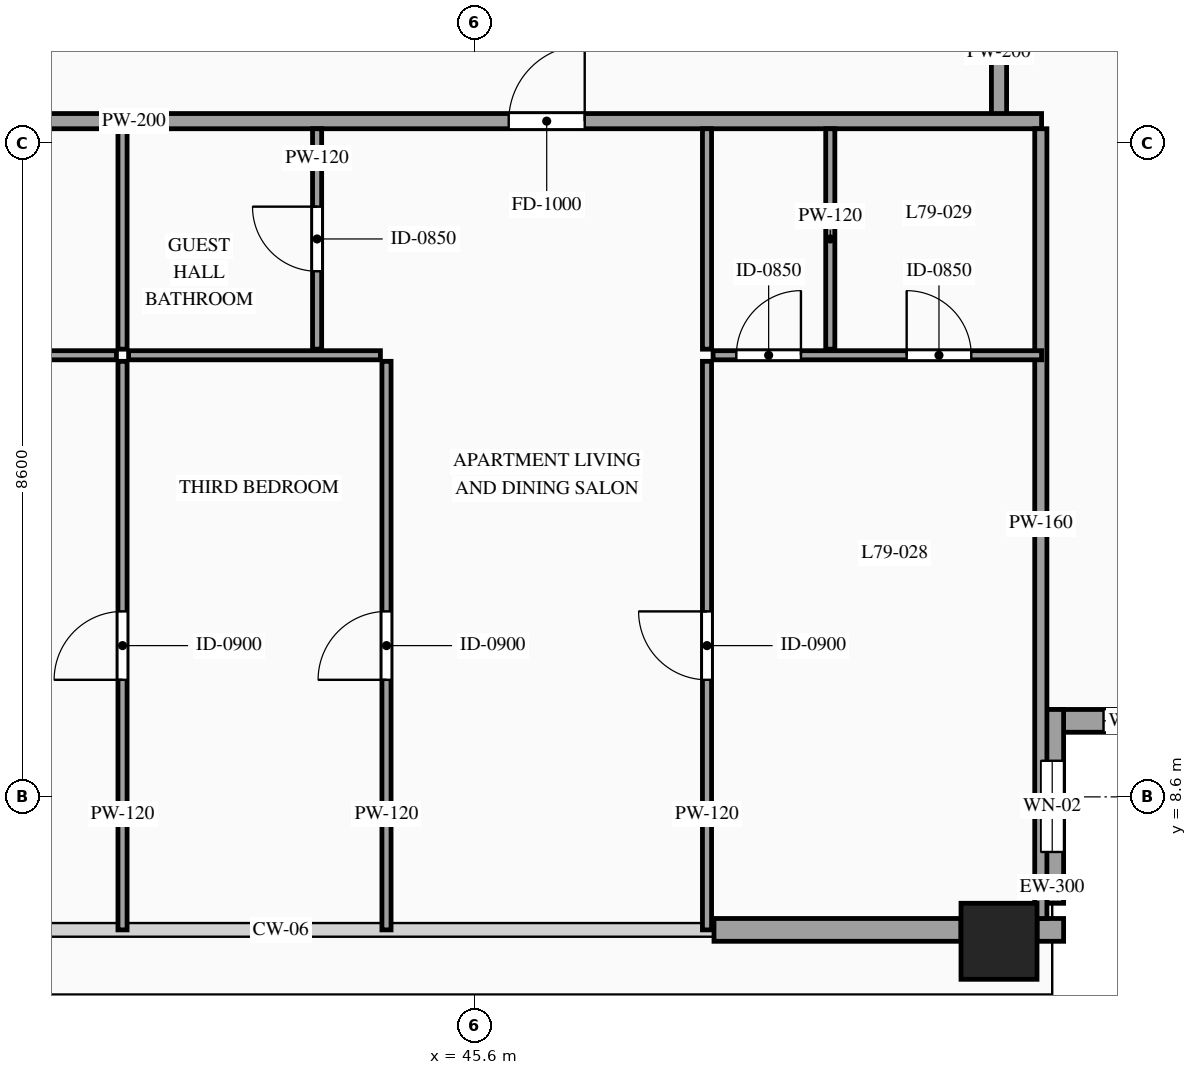
"""IFC4 building model, lengths in metres.
Left out: names, types, materials, properties, quantities, classifications, styles, units other than length and angle.
Written with IfcOpenShell. Run it as: python <this file> out.ifc"""

import sys

from ifc_helpers import new_model, si_unit, direction, frame, frame_2d, origin, origin_2d, place, context, subcontext, project, spatial, rectangle, hollow_rectangle, extrude, source, transform, mapped, element, fill, save


model = new_model("IFC4")
c1 = context("Model", 3, precision=1e-05, world=origin(), true_north=direction((0.0, 1.0)))
c2 = subcontext(c1, "Body", "Model", "MODEL_VIEW")
j1 = project(units=[si_unit("LENGTHUNIT", "METRE"), si_unit("PLANEANGLEUNIT", "RADIAN")], contexts=[c1])
p1 = place(None, origin())
s1 = spatial("IfcSite", under=j1, at=p1, CompositionType="ELEMENT")
p2 = place(p1, origin())
s2 = spatial("IfcBuilding", under=s1, at=p2, CompositionType="ELEMENT")
p3 = place(p2, frame((0.0, 0.0, 296.1)))
s3 = spatial("IfcBuildingStorey", under=s2, at=p3, CompositionType="ELEMENT", Elevation=296.1)
m1 = source(origin(), c2, "Body", "SweptSolid", [
    extrude(hollow_rectangle(XDim=1.0, YDim=1.0, WallThickness=0.048, at=origin_2d()), origin(), (0.0, 0.0, 1.0), 3.5),
])
p4 = place(p3, frame((52.5, 6.7, 0.0), z_axis=(0.0, 0.0, 1.0), x_axis=(1.0, 0.0, 0.0)))
e1 = element("IfcColumn", 1, at=p4, inside=s3, PredefinedType="COLUMN", context=c2, shape_type="MappedRepresentation", body=[
    mapped(m1, transform((0.0, 0.0, 0.0), scale=1.0)),
])
p5 = place(p3, frame((53.05, 9.6, 0.0), z_axis=(0.0, 0.0, 1.0), x_axis=(1.0, 0.0, 0.0)))
e2 = element("IfcWall", 2, at=p5, inside=s3, PredefinedType="SOLIDWALL", context=c2, shape_type="SweptSolid", body=[
    extrude(rectangle(XDim=2.55, YDim=0.3, at=frame_2d((1.275, 0.0))), origin(), (0.0, 0.0, 1.0), 3.28),
])
p6 = place(p5, frame((0.825, 0.0, 0.85)))
e3 = element("IfcOpeningElement", 3, at=p6, cuts=e2, PredefinedType="OPENING", context=c2, shape_type="SweptSolid", body=[
    extrude(rectangle(XDim=0.9, YDim=1.5, at=frame_2d((0.45, 0.75))), frame((0.0, 0.165, 0.0), z_axis=(0.0, -1.0, 0.0), x_axis=(1.0, 0.0, 0.0)), (0.0, 0.0, 1.0), 0.33),
])
p7 = place(p3, frame((53.2, 7.2, 0.0), z_axis=(0.0, 0.0, 1.0), x_axis=(0.0, 1.0, 0.0)))
e4 = element("IfcWall", 4, at=p7, inside=s3, PredefinedType="SOLIDWALL", context=c2, shape_type="SweptSolid", body=[
    extrude(rectangle(XDim=2.55, YDim=0.3, at=frame_2d((1.275, 0.0))), origin(), (0.0, 0.0, 1.0), 3.28),
])
p8 = place(p7, frame((0.675, 0.0, 0.85)))
e5 = element("IfcOpeningElement", 5, at=p8, cuts=e4, PredefinedType="OPENING", context=c2, shape_type="SweptSolid", body=[
    extrude(rectangle(XDim=1.2, YDim=2.1, at=frame_2d((0.6, 1.05))), frame((0.0, 0.165, 0.0), z_axis=(0.0, -1.0, 0.0), x_axis=(1.0, 0.0, 0.0)), (0.0, 0.0, 1.0), 0.33),
])
m2 = source(origin(), c2, "Body", "SweptSolid", [
    extrude(rectangle(XDim=0.35, YDim=0.3, at=frame_2d((0.175, 0.0))), origin(), (0.0, 0.0, 1.0), 3.28),
])
p9 = place(p3, frame((53.0, 6.85, 0.0), z_axis=(0.0, 0.0, 1.0), x_axis=(1.0, 0.0, 0.0)))
e6 = element("IfcWall", 6, at=p9, inside=s3, PredefinedType="SOLIDWALL", context=c2, shape_type="MappedRepresentation", body=[
    mapped(m2, transform((0.0, 0.0, 0.0), scale=1.0)),
])
m3 = source(origin(), c2, "Body", "SweptSolid", [
    extrude(rectangle(XDim=3.25, YDim=0.3, at=frame_2d((1.625, 0.0))), origin(), (0.0, 0.0, 1.0), 2.885),
])
p10 = place(p3, frame((48.75, 6.85, 0.0), z_axis=(0.0, 0.0, 1.0), x_axis=(1.0, 0.0, 0.0)))
e7 = element("IfcWall", 7, at=p10, inside=s3, PredefinedType="SOLIDWALL", context=c2, shape_type="MappedRepresentation", body=[
    mapped(m3, transform((0.0, 0.0, 0.0), scale=1.0)),
])
m4 = source(origin(), c2, "Body", "SweptSolid", [
    extrude(rectangle(XDim=1.7, YDim=0.2, at=frame_2d((0.85, 0.0))), origin(), (0.0, 0.0, 1.0), 3.28),
])
p11 = place(p3, frame((52.5, 17.55, 0.0), z_axis=(0.0, 0.0, 1.0), x_axis=(0.0, 1.0, 0.0)))
e8 = element("IfcWall", 8, at=p11, inside=s3, PredefinedType="PARTITIONING", context=c2, shape_type="MappedRepresentation", body=[
    mapped(m4, transform((0.0, 0.0, 0.0), scale=1.0)),
])
p12 = place(p3, frame((36.438, 17.49, 0.0), z_axis=(0.0, 0.0, 1.0), x_axis=(1.0, 0.0, 0.0)))
e9 = element("IfcWall", 9, at=p12, inside=s3, PredefinedType="PARTITIONING", context=c2, shape_type="SweptSolid", body=[
    extrude(rectangle(XDim=16.622, YDim=0.2, at=frame_2d((8.311, 0.0))), origin(), (0.0, 0.0, 1.0), 3.28),
])
p13 = place(p12, frame((9.611, 0.0, 0.0)))
e10 = element("IfcOpeningElement", 10, at=p13, cuts=e9, PredefinedType="OPENING", context=c2, shape_type="SweptSolid", body=[
    extrude(rectangle(XDim=1.0, YDim=2.2, at=frame_2d((0.5, 1.1))), frame((0.0, 0.115, 0.0), z_axis=(0.0, -1.0, 0.0), x_axis=(1.0, 0.0, 0.0)), (0.0, 0.0, 1.0), 0.23),
])
m5 = source(origin(), c2, "Body", "SweptSolid", [
    extrude(rectangle(XDim=10.39, YDim=0.16, at=frame_2d((5.195, 0.0))), origin(), (0.0, 0.0, 1.0), 3.28),
])
p14 = place(p3, frame((53.05, 7.0, 0.0), z_axis=(0.0, 0.0, 1.0), x_axis=(0.0, 1.0, 0.0)))
e11 = element("IfcWall", 11, at=p14, inside=s3, PredefinedType="PARTITIONING", context=c2, shape_type="MappedRepresentation", body=[
    mapped(m5, transform((0.0, 0.0, 0.0), scale=1.0)),
])
p15 = place(p3, frame((36.438, 14.41, 0.0), z_axis=(0.0, 0.0, 1.0), x_axis=(1.0, 0.0, 0.0)))
e12 = element("IfcWall", 12, at=p15, inside=s3, PredefinedType="PARTITIONING", context=c2, shape_type="SweptSolid", body=[
    extrude(rectangle(XDim=4.45, YDim=0.12, at=frame_2d((2.225, 0.0))), origin(), (0.0, 0.0, 1.0), 3.28),
])
p16 = place(p15, frame((1.8, 0.0, 0.0)))
e13 = element("IfcOpeningElement", 13, at=p16, cuts=e12, PredefinedType="OPENING", context=c2, shape_type="SweptSolid", body=[
    extrude(rectangle(XDim=0.85, YDim=2.1, at=frame_2d((0.425, 1.05))), frame((0.0, 0.075, 0.0), z_axis=(0.0, -1.0, 0.0), x_axis=(1.0, 0.0, 0.0)), (0.0, 0.0, 1.0), 0.15),
])
m6 = source(origin(), c2, "Body", "SweptSolid", [
    extrude(rectangle(XDim=2.9, YDim=0.12, at=frame_2d((1.45, 0.0))), origin(), (0.0, 0.0, 1.0), 3.28),
])
p17 = place(p3, frame((40.968, 14.49, 0.0), z_axis=(0.0, 0.0, 1.0), x_axis=(0.0, 1.0, 0.0)))
e14 = element("IfcWall", 14, at=p17, inside=s3, PredefinedType="PARTITIONING", context=c2, shape_type="MappedRepresentation", body=[
    mapped(m6, transform((0.0, 0.0, 0.0), scale=1.0)),
])
p18 = place(p3, frame((43.528, 14.49, 0.0), z_axis=(0.0, 0.0, 1.0), x_axis=(0.0, 1.0, 0.0)))
e15 = element("IfcWall", 15, at=p18, inside=s3, PredefinedType="PARTITIONING", context=c2, shape_type="SweptSolid", body=[
    extrude(rectangle(XDim=2.9, YDim=0.12, at=frame_2d((1.45, 0.0))), origin(), (0.0, 0.0, 1.0), 3.28),
])
p19 = place(p18, frame((1.025, 0.0, 0.0)))
e16 = element("IfcOpeningElement", 16, at=p19, cuts=e15, PredefinedType="OPENING", context=c2, shape_type="SweptSolid", body=[
    extrude(rectangle(XDim=0.85, YDim=2.1, at=frame_2d((0.425, 1.05))), frame((0.0, 0.075, 0.0), z_axis=(0.0, -1.0, 0.0), x_axis=(1.0, 0.0, 0.0)), (0.0, 0.0, 1.0), 0.15),
])
m7 = source(origin(), c2, "Body", "SweptSolid", [
    extrude(rectangle(XDim=2.9, YDim=0.12, at=frame_2d((1.45, 0.0))), origin(), (0.0, 0.0, 1.0), 2.825),
])
p20 = place(p3, frame((50.28, 14.49, 0.0), z_axis=(0.0, 0.0, 1.0), x_axis=(0.0, 1.0, 0.0)))
e17 = element("IfcWall", 17, at=p20, inside=s3, PredefinedType="PARTITIONING", context=c2, shape_type="MappedRepresentation", body=[
    mapped(m7, transform((0.0, 0.0, 0.0), scale=1.0)),
])
p21 = place(p3, frame((48.658, 14.49, 0.0), z_axis=(0.0, 0.0, 1.0), x_axis=(0.0, 1.0, 0.0)))
e18 = element("IfcWall", 18, at=p21, inside=s3, PredefinedType="PARTITIONING", context=c2, shape_type="MappedRepresentation", body=[
    mapped(m6, transform((0.0, 0.0, 0.0), scale=1.0)),
])
p22 = place(p3, frame((40.968, 6.85, 0.0), z_axis=(0.0, 0.0, 1.0), x_axis=(0.0, 1.0, 0.0)))
e19 = element("IfcWall", 19, at=p22, inside=s3, PredefinedType="PARTITIONING", context=c2, shape_type="SweptSolid", body=[
    extrude(rectangle(XDim=7.48, YDim=0.12, at=frame_2d((3.74, 0.0))), origin(), (0.0, 0.0, 1.0), 3.28),
])
p23 = place(p22, frame((3.29, 0.0, 0.0)))
e20 = element("IfcOpeningElement", 20, at=p23, cuts=e19, PredefinedType="OPENING", context=c2, shape_type="SweptSolid", body=[
    extrude(rectangle(XDim=0.9, YDim=2.15, at=frame_2d((0.45, 1.075))), frame((0.0, 0.075, 0.0), z_axis=(0.0, -1.0, 0.0), x_axis=(1.0, 0.0, 0.0)), (0.0, 0.0, 1.0), 0.15),
])
p24 = place(p3, frame((48.738, 14.41, 0.0), z_axis=(0.0, 0.0, 1.0), x_axis=(1.0, 0.0, 0.0)))
e21 = element("IfcWall", 21, at=p24, inside=s3, PredefinedType="PARTITIONING", context=c2, shape_type="SweptSolid", body=[
    extrude(rectangle(XDim=4.322, YDim=0.12, at=frame_2d((2.161, 0.0))), origin(), (0.0, 0.0, 1.0), 3.28),
])
p25 = place(p24, frame((2.547, 0.0, 0.0)))
e22 = element("IfcOpeningElement", 22, at=p25, cuts=e21, PredefinedType="OPENING", context=c2, shape_type="SweptSolid", body=[
    extrude(rectangle(XDim=0.85, YDim=2.1, at=frame_2d((0.425, 1.05))), frame((0.0, 0.075, 0.0), z_axis=(0.0, -1.0, 0.0), x_axis=(1.0, 0.0, 0.0)), (0.0, 0.0, 1.0), 0.15),
])
p26 = place(p24, frame((0.306, 0.0, 0.0)))
e23 = element("IfcOpeningElement", 23, at=p26, cuts=e21, PredefinedType="OPENING", context=c2, shape_type="SweptSolid", body=[
    extrude(rectangle(XDim=0.85, YDim=2.1, at=frame_2d((0.425, 1.05))), frame((0.0, 0.075, 0.0), z_axis=(0.0, -1.0, 0.0), x_axis=(1.0, 0.0, 0.0)), (0.0, 0.0, 1.0), 0.15),
])
p27 = place(p3, frame((48.658, 6.85, 0.0), z_axis=(0.0, 0.0, 1.0), x_axis=(0.0, 1.0, 0.0)))
e24 = element("IfcWall", 24, at=p27, inside=s3, PredefinedType="PARTITIONING", context=c2, shape_type="SweptSolid", body=[
    extrude(rectangle(XDim=7.48, YDim=0.12, at=frame_2d((3.74, 0.0))), origin(), (0.0, 0.0, 1.0), 3.28),
])
p28 = place(p27, frame((3.29, 0.0, 0.0)))
e25 = element("IfcOpeningElement", 25, at=p28, cuts=e24, PredefinedType="OPENING", context=c2, shape_type="SweptSolid", body=[
    extrude(rectangle(XDim=0.9, YDim=2.15, at=frame_2d((0.45, 1.075))), frame((0.0, 0.075, 0.0), z_axis=(0.0, -1.0, 0.0), x_axis=(1.0, 0.0, 0.0)), (0.0, 0.0, 1.0), 0.15),
])
m8 = source(origin(), c2, "Body", "SweptSolid", [
    extrude(rectangle(XDim=3.313, YDim=0.12, at=frame_2d((1.656, 0.0))), origin(), (0.0, 0.0, 1.0), 3.28),
])
p29 = place(p3, frame((41.048, 14.41, 0.0), z_axis=(0.0, 0.0, 1.0), x_axis=(1.0, 0.0, 0.0)))
e26 = element("IfcWall", 26, at=p29, inside=s3, PredefinedType="PARTITIONING", context=c2, shape_type="MappedRepresentation", body=[
    mapped(m8, transform((0.0, 0.0, 0.0), scale=1.0)),
])
p30 = place(p3, frame((44.441, 6.85, 0.0), z_axis=(0.0, 0.0, 1.0), x_axis=(0.0, 1.0, 0.0)))
e27 = element("IfcWall", 27, at=p30, inside=s3, PredefinedType="PARTITIONING", context=c2, shape_type="SweptSolid", body=[
    extrude(rectangle(XDim=7.48, YDim=0.12, at=frame_2d((3.74, 0.0))), origin(), (0.0, 0.0, 1.0), 3.28),
])
p31 = place(p30, frame((3.29, 0.0, 0.0)))
e28 = element("IfcOpeningElement", 28, at=p31, cuts=e27, PredefinedType="OPENING", context=c2, shape_type="SweptSolid", body=[
    extrude(rectangle(XDim=0.9, YDim=2.15, at=frame_2d((0.45, 1.075))), frame((0.0, 0.075, 0.0), z_axis=(0.0, -1.0, 0.0), x_axis=(1.0, 0.0, 0.0)), (0.0, 0.0, 1.0), 0.15),
])
m9 = source(origin(), c2, "Body", "SweptSolid", [
    extrude(rectangle(XDim=0.9, YDim=1.5, at=frame_2d((0.45, 0.75))), frame((0.0, 0.03, 0.0), z_axis=(0.0, -1.0, 0.0), x_axis=(1.0, 0.0, 0.0)), (0.0, 0.0, 1.0), 0.06),
])
p32 = place(p6, origin())
e29 = element("IfcWindow", 29, at=p32, inside=s3, PartitioningType="SINGLE_PANEL", PredefinedType="WINDOW", context=c2, shape_type="MappedRepresentation", body=[
    mapped(m9, transform((0.0, 0.0, 0.0), scale=1.0)),
])
fill(e3, e29)
m10 = source(origin(), c2, "Body", "SweptSolid", [
    extrude(rectangle(XDim=1.2, YDim=2.1, at=frame_2d((0.6, 1.05))), frame((0.0, 0.03, 0.0), z_axis=(0.0, -1.0, 0.0), x_axis=(1.0, 0.0, 0.0)), (0.0, 0.0, 1.0), 0.06),
])
p33 = place(p8, origin())
e30 = element("IfcWindow", 30, at=p33, inside=s3, PartitioningType="SINGLE_PANEL", PredefinedType="WINDOW", context=c2, shape_type="MappedRepresentation", body=[
    mapped(m10, transform((0.0, 0.0, 0.0), scale=1.0)),
])
fill(e5, e30)
m11 = source(origin(), c2, "Body", "SweptSolid", [
    extrude(rectangle(XDim=1.0, YDim=2.2, at=frame_2d((0.5, 1.1))), frame((0.0, 0.025, 0.0), z_axis=(0.0, -1.0, 0.0), x_axis=(1.0, 0.0, 0.0)), (0.0, 0.0, 1.0), 0.05),
])
p34 = place(p13, origin())
e31 = element("IfcDoor", 31, at=p34, inside=s3, OperationType="SINGLE_SWING_RIGHT", PredefinedType="DOOR", context=c2, shape_type="MappedRepresentation", body=[
    mapped(m11, transform((0.0, 0.0, 0.0), scale=1.0)),
])
fill(e10, e31)
m12 = source(origin(), c2, "Body", "SweptSolid", [
    extrude(rectangle(XDim=0.85, YDim=2.1, at=frame_2d((0.425, 1.05))), frame((0.0, 0.025, 0.0), z_axis=(0.0, -1.0, 0.0), x_axis=(1.0, 0.0, 0.0)), (0.0, 0.0, 1.0), 0.05),
])
p35 = place(p19, origin())
e32 = element("IfcDoor", 32, at=p35, inside=s3, OperationType="SINGLE_SWING_RIGHT", PredefinedType="DOOR", context=c2, shape_type="MappedRepresentation", body=[
    mapped(m12, transform((0.0, 0.0, 0.0), scale=1.0)),
])
fill(e16, e32)
p36 = place(p25, origin())
e33 = element("IfcDoor", 33, at=p36, inside=s3, OperationType="SINGLE_SWING_LEFT", PredefinedType="DOOR", context=c2, shape_type="MappedRepresentation", body=[
    mapped(m12, transform((0.0, 0.0, 0.0), scale=1.0)),
])
fill(e22, e33)
p37 = place(p26, origin())
e34 = element("IfcDoor", 34, at=p37, inside=s3, OperationType="SINGLE_SWING_RIGHT", PredefinedType="DOOR", context=c2, shape_type="MappedRepresentation", body=[
    mapped(m12, transform((0.0, 0.0, 0.0), scale=1.0)),
])
fill(e23, e34)
m13 = source(origin(), c2, "Body", "SweptSolid", [
    extrude(rectangle(XDim=0.9, YDim=2.15, at=frame_2d((0.45, 1.075))), frame((0.0, 0.025, 0.0), z_axis=(0.0, -1.0, 0.0), x_axis=(1.0, 0.0, 0.0)), (0.0, 0.0, 1.0), 0.05),
])
p38 = place(p23, origin())
e35 = element("IfcDoor", 35, at=p38, inside=s3, OperationType="SINGLE_SWING_LEFT", PredefinedType="DOOR", context=c2, shape_type="MappedRepresentation", body=[
    mapped(m13, transform((0.0, 0.0, 0.0), scale=1.0)),
])
fill(e20, e35)
p39 = place(p28, origin())
e36 = element("IfcDoor", 36, at=p39, inside=s3, OperationType="SINGLE_SWING_RIGHT", PredefinedType="DOOR", context=c2, shape_type="MappedRepresentation", body=[
    mapped(m13, transform((0.0, 0.0, 0.0), scale=1.0)),
])
fill(e25, e36)
p40 = place(p31, origin())
e37 = element("IfcDoor", 37, at=p40, inside=s3, OperationType="SINGLE_SWING_LEFT", PredefinedType="DOOR", context=c2, shape_type="MappedRepresentation", body=[
    mapped(m13, transform((0.0, 0.0, 0.0), scale=1.0)),
])
fill(e28, e37)
save(model, sys.argv[1])
